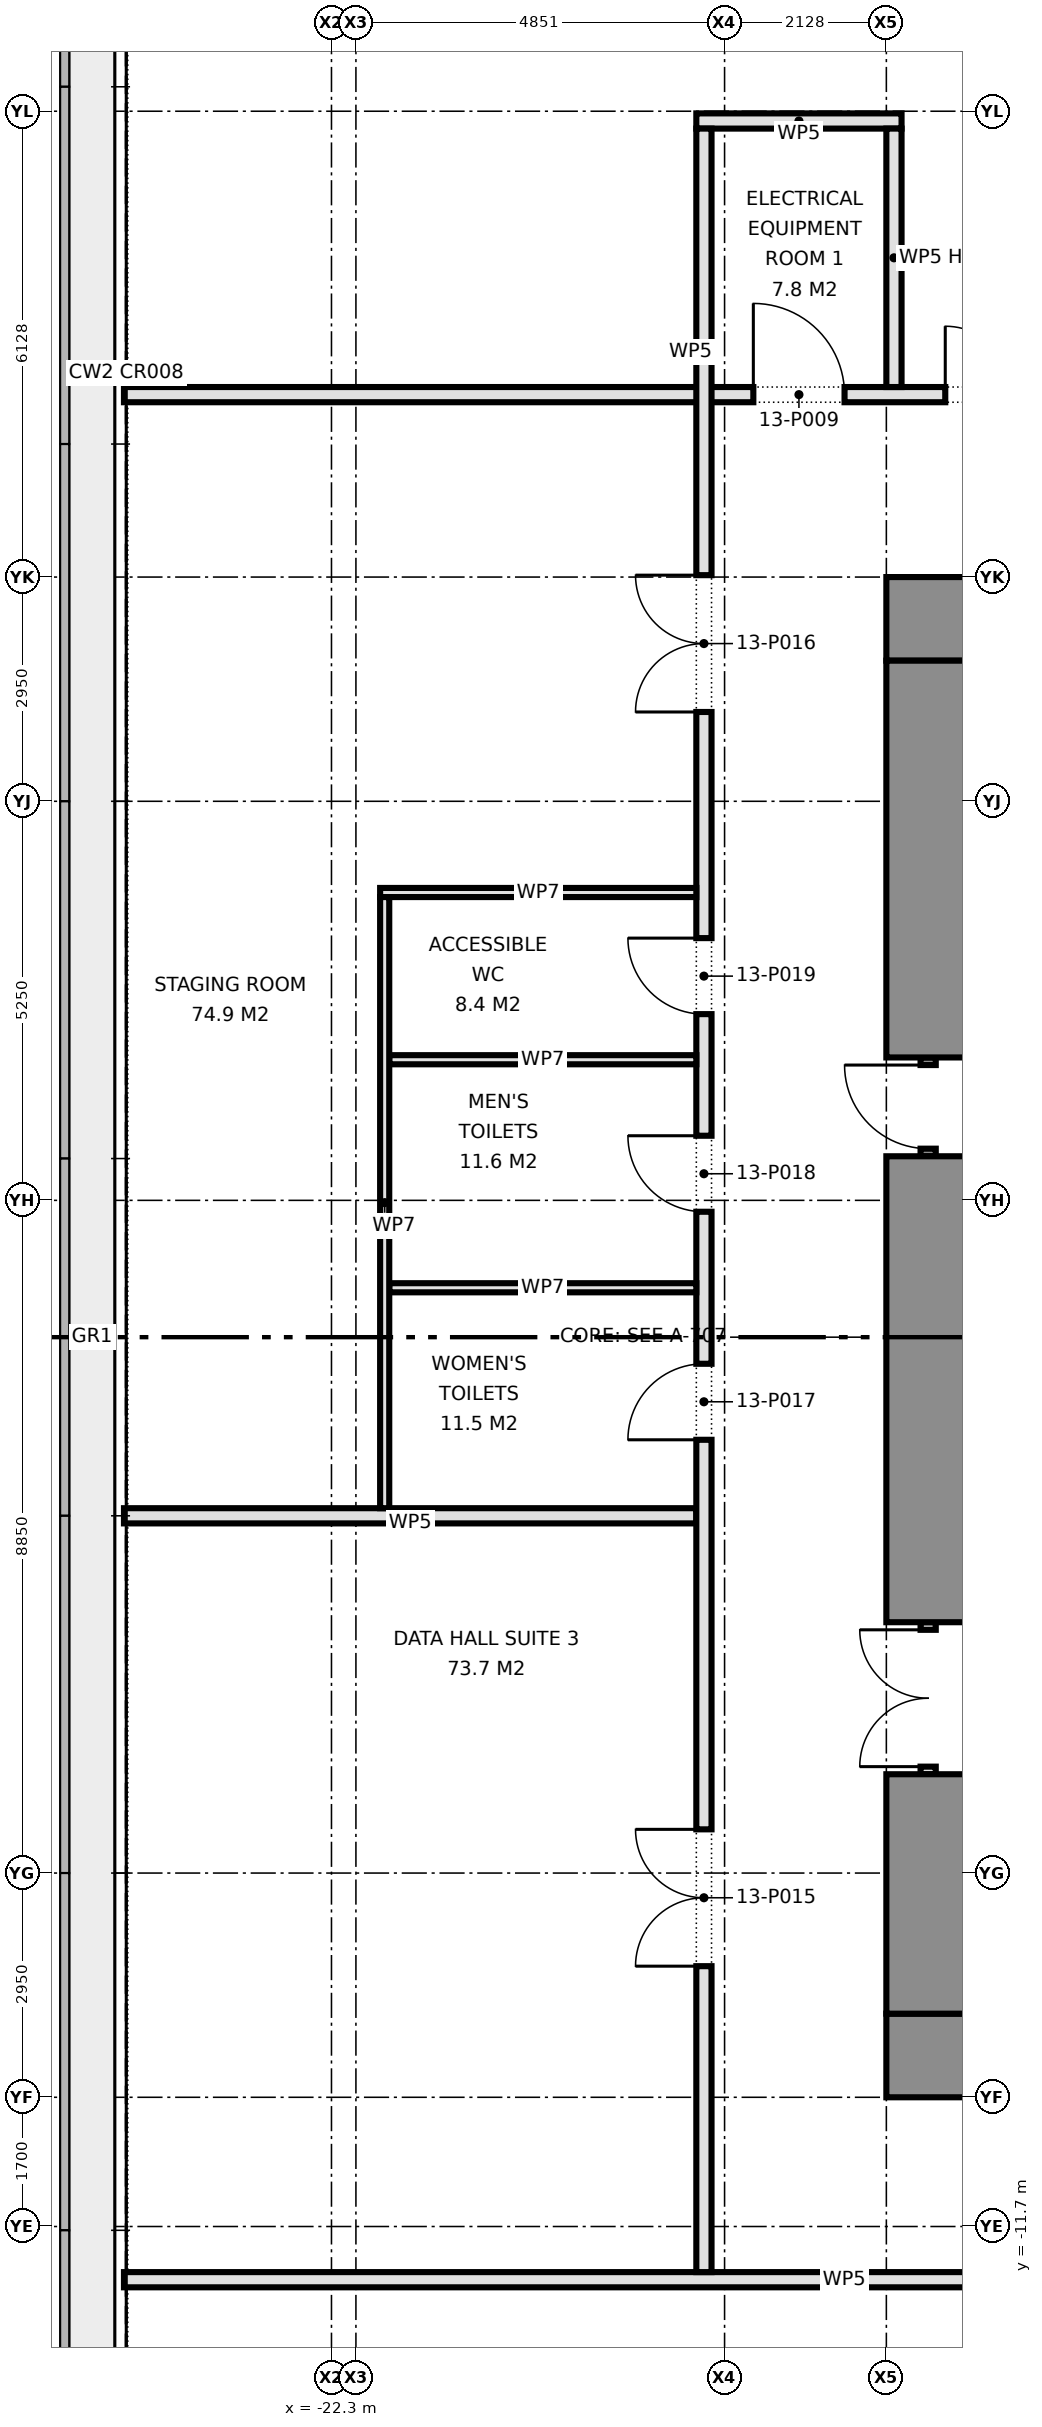
"""IFC4 building model, lengths in metres.
Left out: names, types, materials, properties, quantities, classifications, styles, units other than length and angle.
Written with IfcOpenShell. Run it as: python <this file> out.ifc"""

import sys

from ifc_helpers import new_model, si_unit, direction, frame, frame_2d, origin, place, context, subcontext, project, spatial, rectangle, extrude, element, fill, save


model = new_model("IFC4")
c1 = context("Model", 3, precision=1e-05, world=origin(), true_north=direction((0.0, 1.0)))
c2 = subcontext(c1, "Body", "Model", "MODEL_VIEW")
j1 = project(units=[si_unit("LENGTHUNIT", "METRE"), si_unit("PLANEANGLEUNIT", "RADIAN")], contexts=[c1])
p1 = place(None, origin())
s1 = spatial("IfcSite", under=j1, at=p1, CompositionType="ELEMENT")
p2 = place(p1, origin())
s2 = spatial("IfcBuilding", under=s1, at=p2, CompositionType="ELEMENT")
p3 = place(p2, frame((0.0, 0.0, 59.3)))
s3 = spatial("IfcBuildingStorey", under=s2, at=p3, CompositionType="ELEMENT", Elevation=59.3)
for number, where, z_axis, x_axis in (
    (1, (-15.0, -9.45, 0.0), (0.0, 0.0, 1.0), (1.0, 0.0, 0.0)),
    (2, (-15.0, 9.45, 0.0), (0.0, 0.0, 1.0), (1.0, 0.0, 0.0)),
):
    element("IfcWall", number, at=place(p3, frame(where, z_axis=z_axis, x_axis=x_axis)), inside=s3, PredefinedType="SHEAR", context=c2, shape_type="SweptSolid", body=[
        extrude(rectangle(XDim=11.0, YDim=1.1, at=frame_2d((5.5, 0.0))), origin(), (0.0, 0.0, 1.0), 4.55),
    ])
p4 = place(p3, frame((-14.45, -8.9, 0.0), z_axis=(0.0, 0.0, 1.0), x_axis=(0.0, 1.0, 0.0)))
e3 = element("IfcWall", 3, at=p4, inside=s3, PredefinedType="SHEAR", context=c2, shape_type="SweptSolid", body=[
    extrude(rectangle(XDim=3.15, YDim=1.1, at=frame_2d((1.575, 0.0))), origin(), (0.0, 0.0, 1.0), 4.55),
])
p5 = place(p3, frame((-14.45, -5.75, 0.0), z_axis=(0.0, 0.0, 1.0), x_axis=(0.0, 1.0, 0.0)))
e4 = element("IfcWall", 4, at=p5, inside=s3, PredefinedType="PARTITIONING", context=c2, shape_type="SweptSolid", body=[
    extrude(rectangle(XDim=2.0, YDim=0.2, at=frame_2d((1.0, 0.0))), origin(), (0.0, 0.0, 1.0), 2.4),
])
p6 = place(p5, frame((0.1, 0.0, 0.0)))
e5 = element("IfcOpeningElement", 5, at=p6, cuts=e4, PredefinedType="OPENING", context=c2, shape_type="SweptSolid", body=[
    extrude(rectangle(XDim=1.8, YDim=2.1, at=frame_2d((0.9, 1.05))), frame((0.0, 0.11, 0.0), z_axis=(0.0, -1.0, 0.0), x_axis=(1.0, 0.0, 0.0)), (0.0, 0.0, 1.0), 0.22),
])
p7 = place(p3, frame((-14.45, -3.75, 0.0), z_axis=(0.0, 0.0, 1.0), x_axis=(0.0, 1.0, 0.0)))
e6 = element("IfcWall", 6, at=p7, inside=s3, PredefinedType="SHEAR", context=c2, shape_type="SweptSolid", body=[
    extrude(rectangle(XDim=6.13, YDim=1.1, at=frame_2d((3.065, 0.0))), origin(), (0.0, 0.0, 1.0), 4.55),
])
p8 = place(p3, frame((-14.45, 2.38, 0.0), z_axis=(0.0, 0.0, 1.0), x_axis=(0.0, 1.0, 0.0)))
e7 = element("IfcWall", 7, at=p8, inside=s3, PredefinedType="SHEAR", context=c2, shape_type="SweptSolid", body=[
    extrude(rectangle(XDim=1.3, YDim=0.2, at=frame_2d((0.65, 0.0))), origin(), (0.0, 0.0, 1.0), 2.4),
])
p9 = place(p8, frame((0.1, 0.0, 0.0)))
e8 = element("IfcOpeningElement", 8, at=p9, cuts=e7, PredefinedType="OPENING", context=c2, shape_type="SweptSolid", body=[
    extrude(rectangle(XDim=1.1, YDim=2.1, at=frame_2d((0.55, 1.05))), frame((0.0, 0.11, 0.0), z_axis=(0.0, -1.0, 0.0), x_axis=(1.0, 0.0, 0.0)), (0.0, 0.0, 1.0), 0.22),
])
p10 = place(p3, frame((-14.45, 3.68, 0.0), z_axis=(0.0, 0.0, 1.0), x_axis=(0.0, 1.0, 0.0)))
e9 = element("IfcWall", 9, at=p10, inside=s3, PredefinedType="SHEAR", context=c2, shape_type="SweptSolid", body=[
    extrude(rectangle(XDim=5.22, YDim=1.1, at=frame_2d((2.61, 0.0))), origin(), (0.0, 0.0, 1.0), 4.55),
])
p11 = place(p3, frame((-25.03, -12.4, 0.0), z_axis=(0.0, 0.0, 1.0), x_axis=(1.0, 0.0, 0.0)))
e10 = element("IfcWall", 10, at=p11, inside=s3, PredefinedType="PARTITIONING", context=c2, shape_type="SweptSolid", body=[
    extrude(rectangle(XDim=50.06, YDim=0.2, at=frame_2d((25.03, 0.0))), origin(), (0.0, 0.0, 1.0), 4.55),
])
p12 = place(p11, frame((18.95, 0.0, 0.0)))
e11 = element("IfcOpeningElement", 11, at=p12, cuts=e10, PredefinedType="OPENING", context=c2, shape_type="SweptSolid", body=[
    extrude(rectangle(XDim=1.8, YDim=2.1, at=frame_2d((0.9, 1.05))), frame((0.0, 0.11, 0.0), z_axis=(0.0, -1.0, 0.0), x_axis=(1.0, 0.0, 0.0)), (0.0, 0.0, 1.0), 0.22),
])
p13 = place(p11, frame((37.86, 0.0, 0.0)))
e12 = element("IfcOpeningElement", 12, at=p13, cuts=e10, PredefinedType="OPENING", context=c2, shape_type="SweptSolid", body=[
    extrude(rectangle(XDim=1.8, YDim=2.1, at=frame_2d((0.9, 1.05))), frame((0.0, 0.11, 0.0), z_axis=(0.0, -1.0, 0.0), x_axis=(1.0, 0.0, 0.0)), (0.0, 0.0, 1.0), 0.22),
])
p14 = place(p11, frame((32.98, 0.0, 0.0)))
e13 = element("IfcOpeningElement", 13, at=p14, cuts=e10, PredefinedType="OPENING", context=c2, shape_type="SweptSolid", body=[
    extrude(rectangle(XDim=1.2, YDim=2.1, at=frame_2d((0.6, 1.05))), frame((0.0, 0.11, 0.0), z_axis=(0.0, -1.0, 0.0), x_axis=(1.0, 0.0, 0.0)), (0.0, 0.0, 1.0), 0.22),
])
p15 = place(p3, frame((-25.03, -2.35, 0.0), z_axis=(0.0, 0.0, 1.0), x_axis=(1.0, 0.0, 0.0)))
e14 = element("IfcWall", 14, at=p15, inside=s3, PredefinedType="PARTITIONING", context=c2, shape_type="SweptSolid", body=[
    extrude(rectangle(XDim=7.53, YDim=0.2, at=frame_2d((3.765, 0.0))), origin(), (0.0, 0.0, 1.0), 4.55),
])
p16 = place(p3, frame((-25.03, 12.4, 0.0), z_axis=(0.0, 0.0, 1.0), x_axis=(1.0, 0.0, 0.0)))
e15 = element("IfcWall", 15, at=p16, inside=s3, PredefinedType="PARTITIONING", context=c2, shape_type="SweptSolid", body=[
    extrude(rectangle(XDim=50.06, YDim=0.2, at=frame_2d((25.03, 0.0))), origin(), (0.0, 0.0, 1.0), 4.55),
])
p17 = place(p16, frame((10.805, 0.0, 0.0)))
e16 = element("IfcOpeningElement", 16, at=p17, cuts=e15, PredefinedType="OPENING", context=c2, shape_type="SweptSolid", body=[
    extrude(rectangle(XDim=1.8, YDim=2.1, at=frame_2d((0.9, 1.05))), frame((0.0, 0.11, 0.0), z_axis=(0.0, -1.0, 0.0), x_axis=(1.0, 0.0, 0.0)), (0.0, 0.0, 1.0), 0.22),
])
p18 = place(p16, frame((8.28, 0.0, 0.0)))
e17 = element("IfcOpeningElement", 17, at=p18, cuts=e15, PredefinedType="OPENING", context=c2, shape_type="SweptSolid", body=[
    extrude(rectangle(XDim=1.2, YDim=2.1, at=frame_2d((0.6, 1.05))), frame((0.0, 0.11, 0.0), z_axis=(0.0, -1.0, 0.0), x_axis=(1.0, 0.0, 0.0)), (0.0, 0.0, 1.0), 0.22),
])
p19 = place(p16, frame((21.78, 0.0, 0.0)))
e18 = element("IfcOpeningElement", 18, at=p19, cuts=e15, PredefinedType="OPENING", context=c2, shape_type="SweptSolid", body=[
    extrude(rectangle(XDim=1.8, YDim=2.1, at=frame_2d((0.9, 1.05))), frame((0.0, 0.11, 0.0), z_axis=(0.0, -1.0, 0.0), x_axis=(1.0, 0.0, 0.0)), (0.0, 0.0, 1.0), 0.22),
])
p20 = place(p16, frame((36.36, 0.0, 0.0)))
e19 = element("IfcOpeningElement", 19, at=p20, cuts=e15, PredefinedType="OPENING", context=c2, shape_type="SweptSolid", body=[
    extrude(rectangle(XDim=1.8, YDim=2.1, at=frame_2d((0.9, 1.05))), frame((0.0, 0.11, 0.0), z_axis=(0.0, -1.0, 0.0), x_axis=(1.0, 0.0, 0.0)), (0.0, 0.0, 1.0), 0.22),
])
p21 = place(p3, frame((-17.5, 16.0, 0.0), z_axis=(0.0, 0.0, 1.0), x_axis=(1.0, 0.0, 0.0)))
e20 = element("IfcWall", 20, at=p21, inside=s3, PredefinedType="PARTITIONING", context=c2, shape_type="SweptSolid", body=[
    extrude(rectangle(XDim=2.7, YDim=0.2, at=frame_2d((1.35, 0.0))), origin(), (0.0, 0.0, 1.0), 4.55),
])
p22 = place(p3, frame((-14.9, 12.5, 0.0), z_axis=(0.0, 0.0, 1.0), x_axis=(0.0, 1.0, 0.0)))
e21 = element("IfcWall", 21, at=p22, inside=s3, PredefinedType="PARTITIONING", context=c2, shape_type="SweptSolid", body=[
    extrude(rectangle(XDim=3.4, YDim=0.2, at=frame_2d((1.7, 0.0))), origin(), (0.0, 0.0, 1.0), 3.603),
])
p23 = place(p3, frame((-17.4, -12.3, 0.0), z_axis=(0.0, 0.0, 1.0), x_axis=(0.0, 1.0, 0.0)))
e22 = element("IfcWall", 22, at=p23, inside=s3, PredefinedType="PARTITIONING", context=c2, shape_type="SweptSolid", body=[
    extrude(rectangle(XDim=28.2, YDim=0.2, at=frame_2d((14.1, 0.0))), origin(), (0.0, 0.0, 1.0), 4.55),
])
p24 = place(p23, frame((4.025, 0.0, 0.0)))
e23 = element("IfcOpeningElement", 23, at=p24, cuts=e22, PredefinedType="OPENING", context=c2, shape_type="SweptSolid", body=[
    extrude(rectangle(XDim=1.8, YDim=2.1, at=frame_2d((0.9, 1.05))), frame((0.0, 0.11, 0.0), z_axis=(0.0, -1.0, 0.0), x_axis=(1.0, 0.0, 0.0)), (0.0, 0.0, 1.0), 0.22),
])
p25 = place(p23, frame((20.525, 0.0, 0.0)))
e24 = element("IfcOpeningElement", 24, at=p25, cuts=e22, PredefinedType="OPENING", context=c2, shape_type="SweptSolid", body=[
    extrude(rectangle(XDim=1.8, YDim=2.1, at=frame_2d((0.9, 1.05))), frame((0.0, 0.11, 0.0), z_axis=(0.0, -1.0, 0.0), x_axis=(1.0, 0.0, 0.0)), (0.0, 0.0, 1.0), 0.22),
])
p26 = place(p23, frame((10.95, 0.0, 0.0)))
e25 = element("IfcOpeningElement", 25, at=p26, cuts=e22, PredefinedType="OPENING", context=c2, shape_type="SweptSolid", body=[
    extrude(rectangle(XDim=1.0, YDim=2.1, at=frame_2d((0.5, 1.05))), frame((0.0, 0.11, 0.0), z_axis=(0.0, -1.0, 0.0), x_axis=(1.0, 0.0, 0.0)), (0.0, 0.0, 1.0), 0.22),
])
p27 = place(p23, frame((13.95, 0.0, 0.0)))
e26 = element("IfcOpeningElement", 26, at=p27, cuts=e22, PredefinedType="OPENING", context=c2, shape_type="SweptSolid", body=[
    extrude(rectangle(XDim=1.0, YDim=2.1, at=frame_2d((0.5, 1.05))), frame((0.0, 0.11, 0.0), z_axis=(0.0, -1.0, 0.0), x_axis=(1.0, 0.0, 0.0)), (0.0, 0.0, 1.0), 0.22),
])
p28 = place(p23, frame((16.55, 0.0, 0.0)))
e27 = element("IfcOpeningElement", 27, at=p28, cuts=e22, PredefinedType="OPENING", context=c2, shape_type="SweptSolid", body=[
    extrude(rectangle(XDim=1.0, YDim=2.1, at=frame_2d((0.5, 1.05))), frame((0.0, 0.11, 0.0), z_axis=(0.0, -1.0, 0.0), x_axis=(1.0, 0.0, 0.0)), (0.0, 0.0, 1.0), 0.22),
])
for number, where, z_axis, x_axis in (
    (28, (-21.54, 0.65, 0.0), (0.0, 0.0, 1.0), (1.0, 0.0, 0.0)),
    (29, (-21.54, 3.65, 0.0), (0.0, 0.0, 1.0), (1.0, 0.0, 0.0)),
):
    element("IfcWall", number, at=place(p3, frame(where, z_axis=z_axis, x_axis=x_axis)), inside=s3, PredefinedType="PARTITIONING", context=c2, shape_type="SweptSolid", body=[
        extrude(rectangle(XDim=4.04, YDim=0.12, at=frame_2d((2.02, 0.0))), origin(), (0.0, 0.0, 1.0), 4.55),
    ])
p29 = place(p3, frame((-21.66, 5.85, 0.0), z_axis=(0.0, 0.0, 1.0), x_axis=(1.0, 0.0, 0.0)))
e30 = element("IfcWall", 30, at=p29, inside=s3, PredefinedType="PARTITIONING", context=c2, shape_type="SweptSolid", body=[
    extrude(rectangle(XDim=4.16, YDim=0.12, at=frame_2d((2.08, 0.0))), origin(), (0.0, 0.0, 1.0), 4.55),
])
p30 = place(p3, frame((-21.6, -2.25, 0.0), z_axis=(0.0, 0.0, 1.0), x_axis=(0.0, 1.0, 0.0)))
e31 = element("IfcWall", 31, at=p30, inside=s3, PredefinedType="PARTITIONING", context=c2, shape_type="SweptSolid", body=[
    extrude(rectangle(XDim=8.04, YDim=0.12, at=frame_2d((4.02, 0.0))), origin(), (0.0, 0.0, 1.0), 4.55),
])
p31 = place(p6, origin())
e32 = element("IfcDoor", 32, at=p31, inside=s3, OperationType="DOUBLE_DOOR_SINGLE_SWING", PredefinedType="DOOR", context=c2, shape_type="SweptSolid", body=[
    extrude(rectangle(XDim=1.8, YDim=2.1, at=frame_2d((0.9, 1.05))), frame((0.0, 0.025, 0.0), z_axis=(0.0, -1.0, 0.0), x_axis=(1.0, 0.0, 0.0)), (0.0, 0.0, 1.0), 0.05),
])
fill(e5, e32)
p32 = place(p9, origin())
e33 = element("IfcDoor", 33, at=p32, inside=s3, OperationType="SINGLE_SWING_RIGHT", PredefinedType="DOOR", context=c2, shape_type="SweptSolid", body=[
    extrude(rectangle(XDim=1.1, YDim=2.1, at=frame_2d((0.55, 1.05))), frame((0.0, 0.025, 0.0), z_axis=(0.0, -1.0, 0.0), x_axis=(1.0, 0.0, 0.0)), (0.0, 0.0, 1.0), 0.05),
])
fill(e8, e33)
p33 = place(p17, origin())
e34 = element("IfcDoor", 34, at=p33, inside=s3, OperationType="DOUBLE_DOOR_SINGLE_SWING", PredefinedType="DOOR", context=c2, shape_type="SweptSolid", body=[
    extrude(rectangle(XDim=1.8, YDim=2.1, at=frame_2d((0.9, 1.05))), frame((0.0, 0.025, 0.0), z_axis=(0.0, -1.0, 0.0), x_axis=(1.0, 0.0, 0.0)), (0.0, 0.0, 1.0), 0.05),
])
fill(e16, e34)
p34 = place(p18, origin())
e35 = element("IfcDoor", 35, at=p34, inside=s3, OperationType="SINGLE_SWING_LEFT", PredefinedType="DOOR", context=c2, shape_type="SweptSolid", body=[
    extrude(rectangle(XDim=1.2, YDim=2.1, at=frame_2d((0.6, 1.05))), frame((0.0, 0.025, 0.0), z_axis=(0.0, -1.0, 0.0), x_axis=(1.0, 0.0, 0.0)), (0.0, 0.0, 1.0), 0.05),
])
fill(e17, e35)
p35 = place(p24, origin())
e36 = element("IfcDoor", 36, at=p35, inside=s3, OperationType="DOUBLE_DOOR_SINGLE_SWING", PredefinedType="DOOR", context=c2, shape_type="SweptSolid", body=[
    extrude(rectangle(XDim=1.8, YDim=2.1, at=frame_2d((0.9, 1.05))), frame((0.0, 0.025, 0.0), z_axis=(0.0, -1.0, 0.0), x_axis=(1.0, 0.0, 0.0)), (0.0, 0.0, 1.0), 0.05),
])
fill(e23, e36)
p36 = place(p25, origin())
e37 = element("IfcDoor", 37, at=p36, inside=s3, OperationType="DOUBLE_DOOR_SINGLE_SWING", PredefinedType="DOOR", context=c2, shape_type="SweptSolid", body=[
    extrude(rectangle(XDim=1.8, YDim=2.1, at=frame_2d((0.9, 1.05))), frame((0.0, 0.025, 0.0), z_axis=(0.0, -1.0, 0.0), x_axis=(1.0, 0.0, 0.0)), (0.0, 0.0, 1.0), 0.05),
])
fill(e24, e37)
p37 = place(p26, origin())
e38 = element("IfcDoor", 38, at=p37, inside=s3, OperationType="SINGLE_SWING_LEFT", PredefinedType="DOOR", context=c2, shape_type="SweptSolid", body=[
    extrude(rectangle(XDim=1.0, YDim=2.1, at=frame_2d((0.5, 1.05))), frame((0.0, 0.025, 0.0), z_axis=(0.0, -1.0, 0.0), x_axis=(1.0, 0.0, 0.0)), (0.0, 0.0, 1.0), 0.05),
])
fill(e25, e38)
p38 = place(p27, origin())
e39 = element("IfcDoor", 39, at=p38, inside=s3, OperationType="SINGLE_SWING_RIGHT", PredefinedType="DOOR", context=c2, shape_type="SweptSolid", body=[
    extrude(rectangle(XDim=1.0, YDim=2.1, at=frame_2d((0.5, 1.05))), frame((0.0, 0.025, 0.0), z_axis=(0.0, -1.0, 0.0), x_axis=(1.0, 0.0, 0.0)), (0.0, 0.0, 1.0), 0.05),
])
fill(e26, e39)
p39 = place(p28, origin())
e40 = element("IfcDoor", 40, at=p39, inside=s3, OperationType="SINGLE_SWING_RIGHT", PredefinedType="DOOR", context=c2, shape_type="SweptSolid", body=[
    extrude(rectangle(XDim=1.0, YDim=2.1, at=frame_2d((0.5, 1.05))), frame((0.0, 0.025, 0.0), z_axis=(0.0, -1.0, 0.0), x_axis=(1.0, 0.0, 0.0)), (0.0, 0.0, 1.0), 0.05),
])
fill(e27, e40)
save(model, sys.argv[1])
